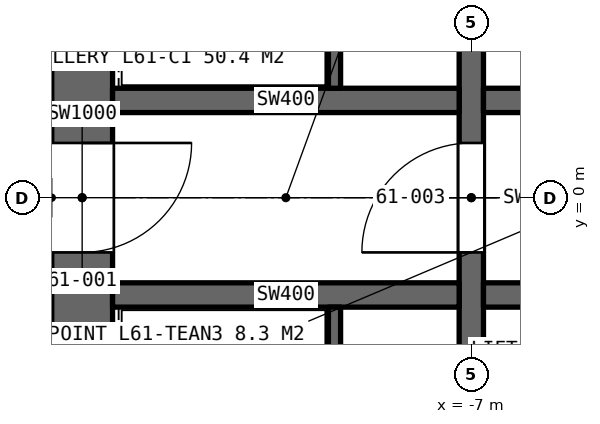
"""IFC4 building model, lengths in metres.
Left out: names, types, materials, properties, quantities, classifications, styles, units other than length and angle.
Written with IfcOpenShell. Run it as: python <this file> out.ifc"""

import sys

from ifc_helpers import new_model, si_unit, direction, frame, frame_2d, origin, place, context, subcontext, project, spatial, rectangle, extrude, element, fill, save


model = new_model("IFC4")
c1 = context("Model", 3, precision=1e-05, world=origin(), true_north=direction((0.0, 1.0)))
c2 = subcontext(c1, "Body", "Model", "MODEL_VIEW")
j1 = project(units=[si_unit("LENGTHUNIT", "METRE"), si_unit("PLANEANGLEUNIT", "RADIAN")], contexts=[c1])
p1 = place(None, origin())
s1 = spatial("IfcSite", under=j1, at=p1, CompositionType="ELEMENT")
p2 = place(p1, origin())
s2 = spatial("IfcBuilding", under=s1, at=p2, CompositionType="ELEMENT")
p3 = place(p2, frame((0.0, 0.0, 275.4)))
s3 = spatial("IfcBuildingStorey", under=s2, at=p3, CompositionType="ELEMENT", Elevation=275.4)
p4 = place(p3, frame((-13.4, 8.9, 0.0), z_axis=(0.0, 0.0, 1.0), x_axis=(0.0, -1.0, 0.0)))
e1 = element("IfcWall", 1, at=p4, inside=s3, PredefinedType="SHEAR", context=c2, shape_type="SweptSolid", body=[
    extrude(rectangle(XDim=17.8, YDim=1.0, at=frame_2d((8.9, 0.0))), origin(), (0.0, 0.0, 1.0), 4.2),
])
p5 = place(p4, frame((8.0, 0.0, 0.0)))
e2 = element("IfcOpeningElement", 2, at=p5, cuts=e1, PredefinedType="OPENING", context=c2, shape_type="SweptSolid", body=[
    extrude(rectangle(XDim=1.8, YDim=2.4, at=frame_2d((0.9, 1.2))), frame((0.0, 0.51, 0.0), z_axis=(0.0, -1.0, 0.0), x_axis=(1.0, 0.0, 0.0)), (0.0, 0.0, 1.0), 1.02),
])
p6 = place(p4, frame((16.6, 0.0, 0.0)))
e3 = element("IfcOpeningElement", 3, at=p6, cuts=e1, PredefinedType="OPENING", context=c2, shape_type="SweptSolid", body=[
    extrude(rectangle(XDim=1.0, YDim=2.4, at=frame_2d((0.5, 1.2))), frame((0.0, 0.51, 0.0), z_axis=(0.0, -1.0, 0.0), x_axis=(1.0, 0.0, 0.0)), (0.0, 0.0, 1.0), 1.02),
])
p7 = place(p3, frame((-7.0, -8.9, 0.0), z_axis=(0.0, 0.0, 1.0), x_axis=(0.0, 1.0, 0.0)))
e4 = element("IfcWall", 4, at=p7, inside=s3, PredefinedType="SHEAR", context=c2, shape_type="SweptSolid", body=[
    extrude(rectangle(XDim=17.8, YDim=0.4, at=frame_2d((8.9, 0.0))), origin(), (0.0, 0.0, 1.0), 4.2),
])
p8 = place(p7, frame((8.0, 0.0, 0.0)))
e5 = element("IfcOpeningElement", 5, at=p8, cuts=e4, PredefinedType="OPENING", context=c2, shape_type="SweptSolid", body=[
    extrude(rectangle(XDim=1.8, YDim=2.4, at=frame_2d((0.9, 1.2))), frame((0.0, 0.21, 0.0), z_axis=(0.0, -1.0, 0.0), x_axis=(1.0, 0.0, 0.0)), (0.0, 0.0, 1.0), 0.42),
])
p9 = place(p3, frame((-6.8, 1.6, 0.0), z_axis=(0.0, 0.0, 1.0), x_axis=(1.0, 0.0, 0.0)))
e6 = element("IfcWall", 6, at=p9, inside=s3, PredefinedType="SHEAR", context=c2, shape_type="SweptSolid", body=[
    extrude(rectangle(XDim=13.6, YDim=0.4, at=frame_2d((6.8, 0.0))), origin(), (0.0, 0.0, 1.0), 4.2),
])
p10 = place(p9, frame((1.365, 0.0, 0.0)))
e7 = element("IfcOpeningElement", 7, at=p10, cuts=e6, PredefinedType="OPENING", context=c2, shape_type="SweptSolid", body=[
    extrude(rectangle(XDim=1.0, YDim=2.4, at=frame_2d((0.5, 1.2))), frame((0.0, 0.21, 0.0), z_axis=(0.0, -1.0, 0.0), x_axis=(1.0, 0.0, 0.0)), (0.0, 0.0, 1.0), 0.42),
])
p11 = place(p9, frame((5.1, 0.0, 0.0)))
e8 = element("IfcOpeningElement", 8, at=p11, cuts=e6, PredefinedType="OPENING", context=c2, shape_type="SweptSolid", body=[
    extrude(rectangle(XDim=1.0, YDim=2.4, at=frame_2d((0.5, 1.2))), frame((0.0, 0.21, 0.0), z_axis=(0.0, -1.0, 0.0), x_axis=(1.0, 0.0, 0.0)), (0.0, 0.0, 1.0), 0.42),
])
p12 = place(p9, frame((8.635, 0.0, 0.0)))
e9 = element("IfcOpeningElement", 9, at=p12, cuts=e6, PredefinedType="OPENING", context=c2, shape_type="SweptSolid", body=[
    extrude(rectangle(XDim=1.0, YDim=2.4, at=frame_2d((0.5, 1.2))), frame((0.0, 0.21, 0.0), z_axis=(0.0, -1.0, 0.0), x_axis=(1.0, 0.0, 0.0)), (0.0, 0.0, 1.0), 0.42),
])
p13 = place(p9, frame((11.95, 0.0, 0.0)))
e10 = element("IfcOpeningElement", 10, at=p13, cuts=e6, PredefinedType="OPENING", context=c2, shape_type="SweptSolid", body=[
    extrude(rectangle(XDim=0.9, YDim=2.4, at=frame_2d((0.45, 1.2))), frame((0.0, 0.21, 0.0), z_axis=(0.0, -1.0, 0.0), x_axis=(1.0, 0.0, 0.0)), (0.0, 0.0, 1.0), 0.42),
])
p14 = place(p3, frame((-6.8, -1.6, 0.0), z_axis=(0.0, 0.0, 1.0), x_axis=(1.0, 0.0, 0.0)))
e11 = element("IfcWall", 11, at=p14, inside=s3, PredefinedType="SHEAR", context=c2, shape_type="SweptSolid", body=[
    extrude(rectangle(XDim=13.6, YDim=0.4, at=frame_2d((6.8, 0.0))), origin(), (0.0, 0.0, 1.0), 4.2),
])
p15 = place(p14, frame((11.9, 0.0, 0.0)))
e12 = element("IfcOpeningElement", 12, at=p15, cuts=e11, PredefinedType="OPENING", context=c2, shape_type="SweptSolid", body=[
    extrude(rectangle(XDim=1.0, YDim=2.4, at=frame_2d((0.5, 1.2))), frame((0.0, 0.21, 0.0), z_axis=(0.0, -1.0, 0.0), x_axis=(1.0, 0.0, 0.0)), (0.0, 0.0, 1.0), 0.42),
])
p16 = place(p14, frame((4.5, 0.0, 0.0)))
e13 = element("IfcOpeningElement", 13, at=p16, cuts=e11, PredefinedType="OPENING", context=c2, shape_type="SweptSolid", body=[
    extrude(rectangle(XDim=1.8, YDim=2.4, at=frame_2d((0.9, 1.2))), frame((0.0, 0.21, 0.0), z_axis=(0.0, -1.0, 0.0), x_axis=(1.0, 0.0, 0.0)), (0.0, 0.0, 1.0), 0.42),
])
for number, where, z_axis, x_axis in (
    (14, (-12.9, 1.6, 0.0), (0.0, 0.0, 1.0), (1.0, 0.0, 0.0)),
    (15, (-12.9, -1.6, 0.0), (0.0, 0.0, 1.0), (1.0, 0.0, 0.0)),
):
    element("IfcWall", number, at=place(p3, frame(where, z_axis=z_axis, x_axis=x_axis)), inside=s3, PredefinedType="SHEAR", context=c2, shape_type="SweptSolid", body=[
        extrude(rectangle(XDim=5.7, YDim=0.4, at=frame_2d((2.85, 0.0))), origin(), (0.0, 0.0, 1.0), 4.2),
    ])
for number, where, z_axis, x_axis in (
    (16, (-9.25, 7.2, 0.0), (0.0, 0.0, 1.0), (0.0, -1.0, 0.0)),
    (17, (-9.25, -7.2, 0.0), (0.0, 0.0, 1.0), (0.0, 1.0, 0.0)),
):
    element("IfcWall", number, at=place(p3, frame(where, z_axis=z_axis, x_axis=x_axis)), inside=s3, PredefinedType="SOLIDWALL", context=c2, shape_type="SweptSolid", body=[
        extrude(rectangle(XDim=5.4, YDim=0.2, at=frame_2d((2.7, 0.0))), origin(), (0.0, 0.0, 1.0), 4.2),
    ])
p17 = place(p5, origin())
e18 = element("IfcDoor", 18, at=p17, inside=s3, OperationType="DOUBLE_DOOR_SINGLE_SWING", PredefinedType="DOOR", context=c2, shape_type="SweptSolid", body=[
    extrude(rectangle(XDim=1.8, YDim=2.4, at=frame_2d((0.9, 1.2))), frame((0.0, 0.025, 0.0), z_axis=(0.0, -1.0, 0.0), x_axis=(1.0, 0.0, 0.0)), (0.0, 0.0, 1.0), 0.05),
])
fill(e2, e18)
p18 = place(p8, origin())
e19 = element("IfcDoor", 19, at=p18, inside=s3, OperationType="DOUBLE_DOOR_SINGLE_SWING", PredefinedType="DOOR", context=c2, shape_type="SweptSolid", body=[
    extrude(rectangle(XDim=1.8, YDim=2.4, at=frame_2d((0.9, 1.2))), frame((0.0, 0.025, 0.0), z_axis=(0.0, -1.0, 0.0), x_axis=(1.0, 0.0, 0.0)), (0.0, 0.0, 1.0), 0.05),
])
fill(e5, e19)
save(model, sys.argv[1])
